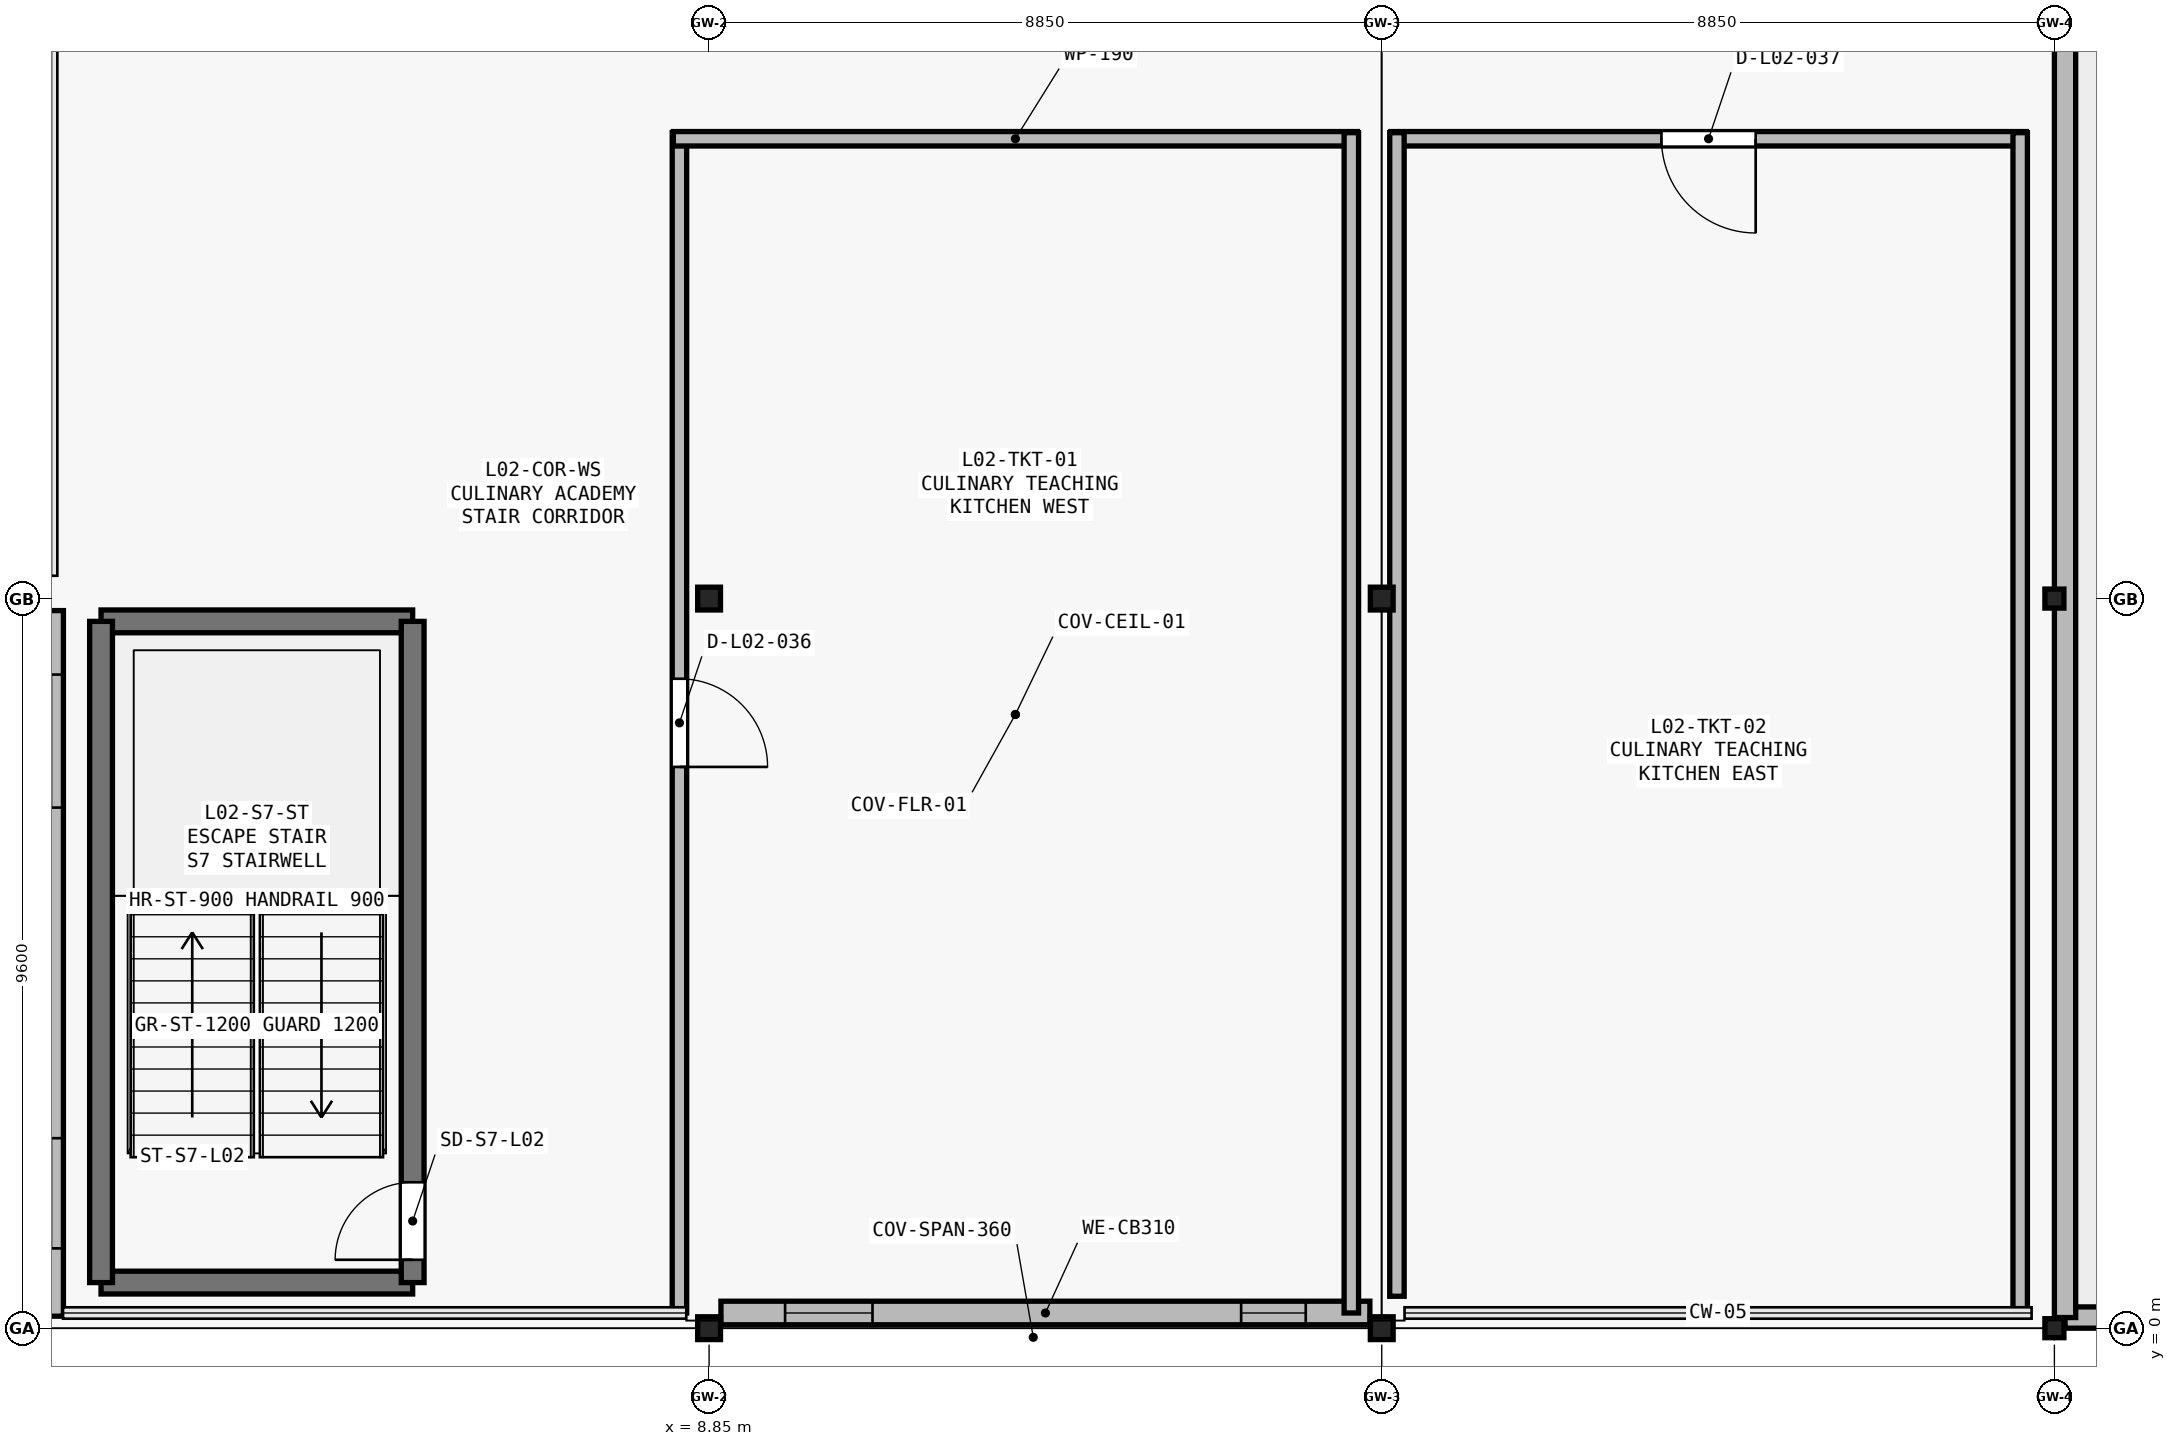
"""IFC4 building model, lengths in metres.
Left out: names, types, materials, properties, quantities, classifications, styles, units other than length and angle.
Written with IfcOpenShell. Run it as: python <this file> out.ifc"""

import sys

from ifc_helpers import new_model, si_unit, direction, frame, frame_2d, origin, origin_2d, place, context, subcontext, project, spatial, rectangle, i_section, extrude, element, fill, save


model = new_model("IFC4")
c1 = context("Model", 3, precision=1e-05, world=origin(), true_north=direction((0.0, 1.0)))
c2 = subcontext(c1, "Body", "Model", "MODEL_VIEW")
j1 = project(units=[si_unit("LENGTHUNIT", "METRE"), si_unit("PLANEANGLEUNIT", "RADIAN")], contexts=[c1])
p1 = place(None, origin())
s1 = spatial("IfcSite", under=j1, at=p1, CompositionType="ELEMENT")
p2 = place(p1, origin())
s2 = spatial("IfcBuilding", under=s1, at=p2, CompositionType="ELEMENT")
p3 = place(p2, frame((0.0, 0.0, 10.8)))
s3 = spatial("IfcBuildingStorey", under=s2, at=p3, CompositionType="ELEMENT", Elevation=10.8)
for number, where, z_axis, x_axis in (
    (1, (8.85, 0.0, 0.0), (0.0, 0.0, 1.0), (1.0, 0.0, 0.0)),
    (2, (8.85, 9.6, 0.0), (0.0, 0.0, 1.0), (1.0, 0.0, 0.0)),
    (3, (17.7, 0.0, 0.0), (0.0, 0.0, 1.0), (1.0, 0.0, 0.0)),
    (4, (17.7, 9.6, 0.0), (0.0, 0.0, 1.0), (1.0, 0.0, 0.0)),
):
    element("IfcColumn", number, at=place(p3, frame(where, z_axis=z_axis, x_axis=x_axis)), inside=s3, PredefinedType="COLUMN", context=c2, shape_type="SweptSolid", body=[
        extrude(i_section(OverallWidth=0.3, OverallDepth=0.3, WebThickness=0.01, FlangeThickness=0.015, FilletRadius=0.018, at=origin_2d()), origin(), (0.0, 0.0, 1.0), 4.2),
    ])
for number, where, z_axis, x_axis in (
    (5, (26.55, 0.0, 0.0), (0.0, 0.0, 1.0), (1.0, 0.0, 0.0)),
    (6, (26.55, 9.6, 0.0), (0.0, 0.0, 1.0), (1.0, 0.0, 0.0)),
):
    element("IfcColumn", number, at=place(p3, frame(where, z_axis=z_axis, x_axis=x_axis)), inside=s3, PredefinedType="COLUMN", context=c2, shape_type="SweptSolid", body=[
        extrude(i_section(OverallWidth=0.25, OverallDepth=0.25, WebThickness=0.009, FlangeThickness=0.014, FilletRadius=0.016, at=origin_2d()), origin(), (0.0, 0.0, 1.0), 4.2),
    ])
p4 = place(p3, frame((17.544, 0.2, 0.0), z_axis=(0.0, 0.0, 1.0), x_axis=(-1.0, 0.0, 0.0)))
e7 = element("IfcWall", 7, at=p4, inside=s3, PredefinedType="SOLIDWALL", context=c2, shape_type="SweptSolid", body=[
    extrude(rectangle(XDim=8.538, YDim=0.31, at=frame_2d((4.269, 0.0))), origin(), (0.0, 0.0, 1.0), 3.35),
])
p5 = place(p4, frame((0.844, 0.0, 0.95)))
e8 = element("IfcOpeningElement", 8, at=p5, cuts=e7, PredefinedType="OPENING", context=c2, shape_type="SweptSolid", body=[
    extrude(rectangle(XDim=0.85, YDim=1.5, at=frame_2d((0.425, 0.75))), frame((0.0, 0.165, 0.0), z_axis=(0.0, -1.0, 0.0), x_axis=(1.0, 0.0, 0.0)), (0.0, 0.0, 1.0), 0.33),
])
p6 = place(p4, frame((6.544, 0.0, 0.95)))
e9 = element("IfcOpeningElement", 9, at=p6, cuts=e7, PredefinedType="OPENING", context=c2, shape_type="SweptSolid", body=[
    extrude(rectangle(XDim=1.15, YDim=1.5, at=frame_2d((0.575, 0.75))), frame((0.0, 0.165, 0.0), z_axis=(0.0, -1.0, 0.0), x_axis=(1.0, 0.0, 0.0)), (0.0, 0.0, 1.0), 0.33),
])
p7 = place(p3, frame((0.2, 0.158, 0.0), z_axis=(0.0, 0.0, 1.0), x_axis=(0.0, 1.0, 0.0)))
e10 = element("IfcWall", 10, at=p7, inside=s3, PredefinedType="SOLIDWALL", context=c2, shape_type="SweptSolid", body=[
    extrude(rectangle(XDim=9.284, YDim=0.31, at=frame_2d((4.642, 0.0))), origin(), (0.0, 0.0, 1.0), 3.35),
])
p8 = place(p7, frame((0.892, 0.0, 0.95)))
e11 = element("IfcOpeningElement", 11, at=p8, cuts=e10, PredefinedType="OPENING", context=c2, shape_type="SweptSolid", body=[
    extrude(rectangle(XDim=1.45, YDim=1.5, at=frame_2d((0.725, 0.75))), frame((0.0, 0.165, 0.0), z_axis=(0.0, -1.0, 0.0), x_axis=(1.0, 0.0, 0.0)), (0.0, 0.0, 1.0), 0.33),
])
p9 = place(p7, frame((6.692, 0.0, 0.95)))
e12 = element("IfcOpeningElement", 12, at=p9, cuts=e10, PredefinedType="OPENING", context=c2, shape_type="SweptSolid", body=[
    extrude(rectangle(XDim=1.75, YDim=1.5, at=frame_2d((0.875, 0.75))), frame((0.0, 0.165, 0.0), z_axis=(0.0, -1.0, 0.0), x_axis=(1.0, 0.0, 0.0)), (0.0, 0.0, 1.0), 0.33),
])
p10 = place(p3, frame((26.69, 0.14, 0.01), z_axis=(0.0, 0.0, 1.0), x_axis=(1.0, 0.0, 0.0)))
e13 = element("IfcWall", 13, at=p10, inside=s3, PredefinedType="PARAPET", context=c2, shape_type="SweptSolid", body=[
    extrude(rectangle(XDim=8.49, YDim=0.28, at=frame_2d((4.245, 0.0))), origin(), (0.0, 0.0, 1.0), 1.15),
])
p11 = place(p3, frame((26.69, 28.66, 0.01), z_axis=(0.0, 0.0, 1.0), x_axis=(0.0, -1.0, 0.0)))
e14 = element("IfcWall", 14, at=p11, inside=s3, PredefinedType="PARAPET", context=c2, shape_type="SweptSolid", body=[
    extrude(rectangle(XDim=28.52, YDim=0.28, at=frame_2d((14.26, 0.0))), origin(), (0.0, 0.0, 1.0), 1.15),
])
for number, where, z_axis, x_axis in (
    (15, (0.85, 0.6, 0.0), (0.0, 0.0, 1.0), (1.0, 0.0, 0.0)),
    (16, (4.95, 9.3, 0.0), (0.0, 0.0, 1.0), (-1.0, 0.0, 0.0)),
):
    element("IfcWall", number, at=place(p3, frame(where, z_axis=z_axis, x_axis=x_axis)), inside=s3, PredefinedType="SHEAR", context=c2, shape_type="SweptSolid", body=[
        extrude(rectangle(XDim=4.1, YDim=0.3, at=frame_2d((2.05, 0.0))), origin(), (0.0, 0.0, 1.0), 4.2),
    ])
p12 = place(p3, frame((0.85, 9.3, 0.0), z_axis=(0.0, 0.0, 1.0), x_axis=(0.0, -1.0, 0.0)))
e17 = element("IfcWall", 17, at=p12, inside=s3, PredefinedType="SHEAR", context=c2, shape_type="SweptSolid", body=[
    extrude(rectangle(XDim=8.7, YDim=0.3, at=frame_2d((4.35, 0.0))), origin(), (0.0, 0.0, 1.0), 4.2),
])
p13 = place(p3, frame((4.95, 0.6, 0.0), z_axis=(0.0, 0.0, 1.0), x_axis=(0.0, 1.0, 0.0)))
e18 = element("IfcWall", 18, at=p13, inside=s3, PredefinedType="SHEAR", context=c2, shape_type="SweptSolid", body=[
    extrude(rectangle(XDim=8.7, YDim=0.3, at=frame_2d((4.35, 0.0))), origin(), (0.0, 0.0, 1.0), 4.2),
])
p14 = place(p13, frame((0.3, 0.0, 0.0)))
e19 = element("IfcOpeningElement", 19, at=p14, cuts=e18, PredefinedType="OPENING", context=c2, shape_type="SweptSolid", body=[
    extrude(rectangle(XDim=1.02, YDim=2.1, at=frame_2d((0.51, 1.05))), frame((0.0, 0.16, 0.0), z_axis=(0.0, -1.0, 0.0), x_axis=(1.0, 0.0, 0.0)), (0.0, 0.0, 1.0), 0.32),
])
p15 = place(p3, frame((8.46, 15.73, 0.0), z_axis=(0.0, 0.0, 1.0), x_axis=(0.0, -1.0, 0.0)))
e20 = element("IfcWall", 20, at=p15, inside=s3, PredefinedType="PARTITIONING", context=c2, shape_type="SweptSolid", body=[
    extrude(rectangle(XDim=15.53, YDim=0.19, at=frame_2d((7.765, 0.0))), origin(), (0.0, 0.0, 1.0), 3.72),
])
p16 = place(p15, frame((7.185, 0.0, 0.0)))
e21 = element("IfcOpeningElement", 21, at=p16, cuts=e20, PredefinedType="OPENING", context=c2, shape_type="SweptSolid", body=[
    extrude(rectangle(XDim=1.16, YDim=2.26, at=frame_2d((0.58, 1.13))), frame((0.0, 0.105, 0.0), z_axis=(0.0, -1.0, 0.0), x_axis=(1.0, 0.0, 0.0)), (0.0, 0.0, 1.0), 0.21),
])
p17 = place(p3, frame((17.38, 15.65, 0.0), z_axis=(0.0, 0.0, 1.0), x_axis=(-1.0, 0.0, 0.0)))
e22 = element("IfcWall", 22, at=p17, inside=s3, PredefinedType="PARTITIONING", context=c2, shape_type="SweptSolid", body=[
    extrude(rectangle(XDim=9.0, YDim=0.19, at=frame_2d((4.5, 0.0))), origin(), (0.0, 0.0, 1.0), 3.72),
])
p18 = place(p3, frame((17.3, 0.2, 0.0), z_axis=(0.0, 0.0, 1.0), x_axis=(0.0, 1.0, 0.0)))
e23 = element("IfcWall", 23, at=p18, inside=s3, PredefinedType="PARTITIONING", context=c2, shape_type="SweptSolid", body=[
    extrude(rectangle(XDim=15.53, YDim=0.19, at=frame_2d((7.765, 0.0))), origin(), (0.0, 0.0, 1.0), 3.72),
])
p19 = place(p3, frame((26.18, 15.65, 0.0), z_axis=(0.0, 0.0, 1.0), x_axis=(-1.0, 0.0, 0.0)))
e24 = element("IfcWall", 24, at=p19, inside=s3, PredefinedType="PARTITIONING", context=c2, shape_type="SweptSolid", body=[
    extrude(rectangle(XDim=8.36, YDim=0.19, at=frame_2d((4.18, 0.0))), origin(), (0.0, 0.0, 1.0), 3.72),
])
p20 = place(p19, frame((3.56, 0.0, 0.0)))
e25 = element("IfcOpeningElement", 25, at=p20, cuts=e24, PredefinedType="OPENING", context=c2, shape_type="SweptSolid", body=[
    extrude(rectangle(XDim=1.24, YDim=2.26, at=frame_2d((0.62, 1.13))), frame((0.0, 0.105, 0.0), z_axis=(0.0, -1.0, 0.0), x_axis=(1.0, 0.0, 0.0)), (0.0, 0.0, 1.0), 0.21),
])
p21 = place(p3, frame((17.9, 15.73, 0.0), z_axis=(0.0, 0.0, 1.0), x_axis=(0.0, -1.0, 0.0)))
e26 = element("IfcWall", 26, at=p21, inside=s3, PredefinedType="PARTITIONING", context=c2, shape_type="SweptSolid", body=[
    extrude(rectangle(XDim=15.31, YDim=0.19, at=frame_2d((7.655, 0.0))), origin(), (0.0, 0.0, 1.0), 3.415),
])
p22 = place(p3, frame((26.1, 0.2, 0.0), z_axis=(0.0, 0.0, 1.0), x_axis=(0.0, 1.0, 0.0)))
e27 = element("IfcWall", 27, at=p22, inside=s3, PredefinedType="PARTITIONING", context=c2, shape_type="SweptSolid", body=[
    extrude(rectangle(XDim=15.53, YDim=0.19, at=frame_2d((7.765, 0.0))), origin(), (0.0, 0.0, 1.0), 3.72),
])
p23 = place(p5, origin())
e28 = element("IfcWindow", 28, at=p23, inside=s3, PartitioningType="SINGLE_PANEL", PredefinedType="WINDOW", context=c2, shape_type="SweptSolid", body=[
    extrude(rectangle(XDim=0.85, YDim=1.5, at=frame_2d((0.425, 0.75))), frame((0.0, 0.03, 0.0), z_axis=(0.0, -1.0, 0.0), x_axis=(1.0, 0.0, 0.0)), (0.0, 0.0, 1.0), 0.06),
])
fill(e8, e28)
p24 = place(p6, origin())
e29 = element("IfcWindow", 29, at=p24, inside=s3, PartitioningType="SINGLE_PANEL", PredefinedType="WINDOW", context=c2, shape_type="SweptSolid", body=[
    extrude(rectangle(XDim=1.15, YDim=1.5, at=frame_2d((0.575, 0.75))), frame((0.0, 0.03, 0.0), z_axis=(0.0, -1.0, 0.0), x_axis=(1.0, 0.0, 0.0)), (0.0, 0.0, 1.0), 0.06),
])
fill(e9, e29)
p25 = place(p8, origin())
e30 = element("IfcWindow", 30, at=p25, inside=s3, PartitioningType="SINGLE_PANEL", PredefinedType="WINDOW", context=c2, shape_type="SweptSolid", body=[
    extrude(rectangle(XDim=1.45, YDim=1.5, at=frame_2d((0.725, 0.75))), frame((0.0, 0.03, 0.0), z_axis=(0.0, -1.0, 0.0), x_axis=(1.0, 0.0, 0.0)), (0.0, 0.0, 1.0), 0.06),
])
fill(e11, e30)
p26 = place(p9, origin())
e31 = element("IfcWindow", 31, at=p26, inside=s3, PartitioningType="SINGLE_PANEL", PredefinedType="WINDOW", context=c2, shape_type="SweptSolid", body=[
    extrude(rectangle(XDim=1.75, YDim=1.5, at=frame_2d((0.875, 0.75))), frame((0.0, 0.03, 0.0), z_axis=(0.0, -1.0, 0.0), x_axis=(1.0, 0.0, 0.0)), (0.0, 0.0, 1.0), 0.06),
])
fill(e12, e31)
p27 = place(p14, origin())
e32 = element("IfcDoor", 32, at=p27, inside=s3, OperationType="SINGLE_SWING_LEFT", PredefinedType="DOOR", context=c2, shape_type="SweptSolid", body=[
    extrude(rectangle(XDim=1.02, YDim=2.1, at=frame_2d((0.51, 1.05))), frame((0.0, 0.025, 0.0), z_axis=(0.0, -1.0, 0.0), x_axis=(1.0, 0.0, 0.0)), (0.0, 0.0, 1.0), 0.05),
])
fill(e19, e32)
p28 = place(p16, origin())
e33 = element("IfcDoor", 33, at=p28, inside=s3, OperationType="SINGLE_SWING_RIGHT", PredefinedType="DOOR", context=c2, shape_type="SweptSolid", body=[
    extrude(rectangle(XDim=1.16, YDim=2.26, at=frame_2d((0.58, 1.13))), frame((0.0, 0.025, 0.0), z_axis=(0.0, -1.0, 0.0), x_axis=(1.0, 0.0, 0.0)), (0.0, 0.0, 1.0), 0.05),
])
fill(e21, e33)
p29 = place(p20, origin())
e34 = element("IfcDoor", 34, at=p29, inside=s3, OperationType="SINGLE_SWING_LEFT", PredefinedType="DOOR", context=c2, shape_type="SweptSolid", body=[
    extrude(rectangle(XDim=1.24, YDim=2.26, at=frame_2d((0.62, 1.13))), frame((0.0, 0.025, 0.0), z_axis=(0.0, -1.0, 0.0), x_axis=(1.0, 0.0, 0.0)), (0.0, 0.0, 1.0), 0.05),
])
fill(e25, e34)
save(model, sys.argv[1])
